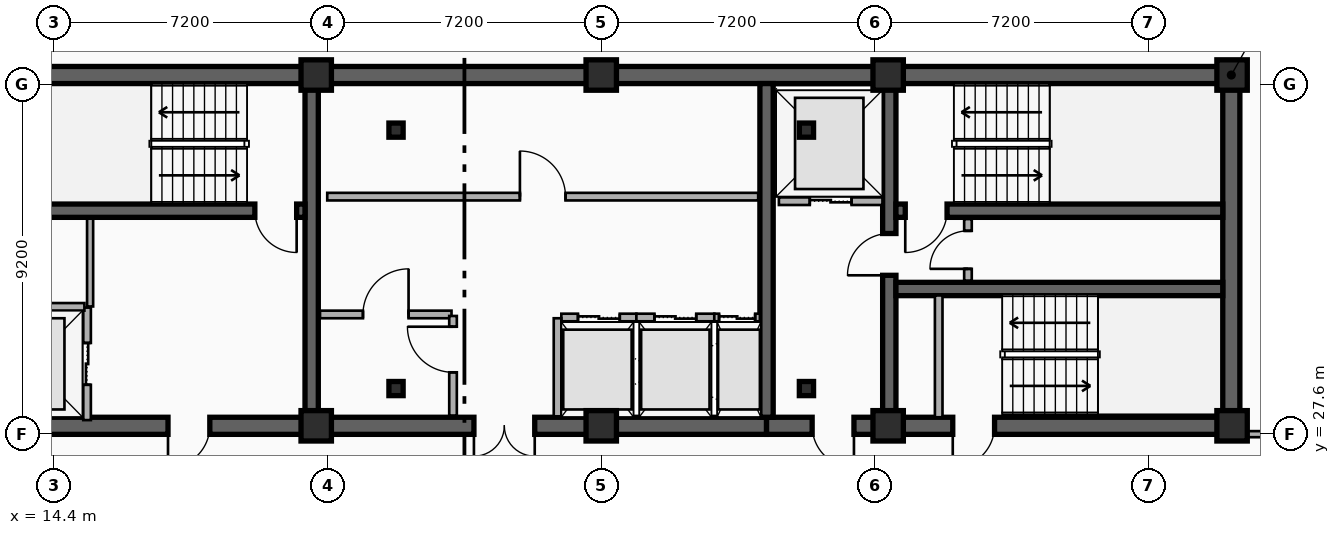
"""IFC4 building model, lengths in metres.
Left out: names, types, materials, properties, quantities, classifications, styles, units other than length and angle.
Written with IfcOpenShell. Run it as: python <this file> out.ifc"""

import sys

from ifc_helpers import new_model, si_unit, direction, frame, frame_2d, origin, origin_2d, place, context, subcontext, project, spatial, rectangle, i_section, extrude, element, fill, save


model = new_model("IFC4")
c1 = context("Model", 3, precision=1e-05, world=origin(), true_north=direction((0.0, 1.0)))
c2 = subcontext(c1, "Body", "Model", "MODEL_VIEW")
j1 = project(units=[si_unit("LENGTHUNIT", "METRE"), si_unit("PLANEANGLEUNIT", "RADIAN")], contexts=[c1])
p1 = place(None, origin())
s1 = spatial("IfcSite", under=j1, at=p1, CompositionType="ELEMENT")
p2 = place(p1, origin())
s2 = spatial("IfcBuilding", under=s1, at=p2, CompositionType="ELEMENT")
p3 = place(p2, frame((0.0, 0.0, 269.5)))
s3 = spatial("IfcBuildingStorey", under=s2, at=p3, CompositionType="ELEMENT", Elevation=269.5)
p4 = place(p3, frame((12.15, 37.05, 0.0), z_axis=(0.0, 0.0, 1.0), x_axis=(1.0, 0.0, 0.0)))
e1 = element("IfcWall", 1, at=p4, inside=s3, PredefinedType="SHEAR", context=c2, shape_type="SweptSolid", body=[
    extrude(rectangle(XDim=33.23, YDim=0.45, at=frame_2d((16.615, 0.0))), origin(), (0.0, 0.0, 1.0), 3.7),
])
p5 = place(p3, frame((21.18, 27.82, 0.0), z_axis=(0.0, 0.0, 1.0), x_axis=(-1.0, 0.0, 0.0)))
e2 = element("IfcWall", 2, at=p5, inside=s3, PredefinedType="SHEAR", context=c2, shape_type="SweptSolid", body=[
    extrude(rectangle(XDim=9.03, YDim=0.45, at=frame_2d((4.515, 0.0))), origin(), (0.0, 0.0, 1.0), 3.7),
])
p6 = place(p5, frame((2.68, 0.0, 0.0)))
e3 = element("IfcOpeningElement", 3, at=p6, cuts=e2, PredefinedType="OPENING", context=c2, shape_type="SweptSolid", body=[
    extrude(rectangle(XDim=1.1, YDim=2.15, at=frame_2d((0.55, 1.075))), frame((0.0, 0.235, 0.0), z_axis=(0.0, -1.0, 0.0), x_axis=(1.0, 0.0, 0.0)), (0.0, 0.0, 1.0), 0.47),
])
p7 = place(p3, frame((33.15, 27.82, 0.0), z_axis=(0.0, 0.0, 1.0), x_axis=(-1.0, 0.0, 0.0)))
e4 = element("IfcWall", 4, at=p7, inside=s3, PredefinedType="SHEAR", context=c2, shape_type="SweptSolid", body=[
    extrude(rectangle(XDim=11.97, YDim=0.45, at=frame_2d((5.985, 0.0))), origin(), (0.0, 0.0, 1.0), 3.7),
])
p8 = place(p7, frame((6.1, 0.0, 0.0)))
e5 = element("IfcOpeningElement", 5, at=p8, cuts=e4, PredefinedType="OPENING", context=c2, shape_type="SweptSolid", body=[
    extrude(rectangle(XDim=1.6, YDim=2.2, at=frame_2d((0.8, 1.1))), frame((0.0, 0.235, 0.0), z_axis=(0.0, -1.0, 0.0), x_axis=(1.0, 0.0, 0.0)), (0.0, 0.0, 1.0), 0.47),
])
p9 = place(p3, frame((45.38, 27.82, 0.0), z_axis=(0.0, 0.0, 1.0), x_axis=(-1.0, 0.0, 0.0)))
e6 = element("IfcWall", 6, at=p9, inside=s3, PredefinedType="SHEAR", context=c2, shape_type="SweptSolid", body=[
    extrude(rectangle(XDim=12.23, YDim=0.45, at=frame_2d((6.115, 0.0))), origin(), (0.0, 0.0, 1.0), 3.7),
])
p10 = place(p9, frame((9.93, 0.0, 0.0)))
e7 = element("IfcOpeningElement", 7, at=p10, cuts=e6, PredefinedType="OPENING", context=c2, shape_type="SweptSolid", body=[
    extrude(rectangle(XDim=1.1, YDim=2.15, at=frame_2d((0.55, 1.075))), frame((0.0, 0.235, 0.0), z_axis=(0.0, -1.0, 0.0), x_axis=(1.0, 0.0, 0.0)), (0.0, 0.0, 1.0), 0.47),
])
p11 = place(p9, frame((6.23, 0.0, 0.0)))
e8 = element("IfcOpeningElement", 8, at=p11, cuts=e6, PredefinedType="OPENING", context=c2, shape_type="SweptSolid", body=[
    extrude(rectangle(XDim=1.1, YDim=2.15, at=frame_2d((0.55, 1.075))), frame((0.0, 0.235, 0.0), z_axis=(0.0, -1.0, 0.0), x_axis=(1.0, 0.0, 0.0)), (0.0, 0.0, 1.0), 0.47),
])
p12 = place(p3, frame((45.38, 28.045, 0.0), z_axis=(0.0, 0.0, 1.0), x_axis=(0.0, 1.0, 0.0)))
e9 = element("IfcWall", 9, at=p12, inside=s3, PredefinedType="SHEAR", context=c2, shape_type="SweptSolid", body=[
    extrude(rectangle(XDim=8.78, YDim=0.45, at=frame_2d((4.39, 0.0))), origin(), (0.0, 0.0, 1.0), 3.7),
])
for number, where, z_axis, x_axis in (
    (10, (21.18, 28.045, 0.0), (0.0, 0.0, 1.0), (0.0, 1.0, 0.0)),
    (11, (33.15, 28.045, 0.0), (0.0, 0.0, 1.0), (0.0, 1.0, 0.0)),
):
    element("IfcWall", number, at=place(p3, frame(where, z_axis=z_axis, x_axis=x_axis)), inside=s3, PredefinedType="SHEAR", context=c2, shape_type="SweptSolid", body=[
        extrude(rectangle(XDim=8.78, YDim=0.35, at=frame_2d((4.39, 0.0))), origin(), (0.0, 0.0, 1.0), 3.7),
    ])
p13 = place(p3, frame((36.38, 28.045, 0.0), z_axis=(0.0, 0.0, 1.0), x_axis=(0.0, 1.0, 0.0)))
e12 = element("IfcWall", 12, at=p13, inside=s3, PredefinedType="SHEAR", context=c2, shape_type="SweptSolid", body=[
    extrude(rectangle(XDim=8.78, YDim=0.35, at=frame_2d((4.39, 0.0))), origin(), (0.0, 0.0, 1.0), 3.7),
])
p14 = place(p13, frame((3.735, 0.0, 0.0)))
e13 = element("IfcOpeningElement", 13, at=p14, cuts=e12, PredefinedType="OPENING", context=c2, shape_type="SweptSolid", body=[
    extrude(rectangle(XDim=1.1, YDim=2.15, at=frame_2d((0.55, 1.075))), frame((0.0, 0.185, 0.0), z_axis=(0.0, -1.0, 0.0), x_axis=(1.0, 0.0, 0.0)), (0.0, 0.0, 1.0), 0.37),
])
p15 = place(p3, frame((21.005, 33.48, 0.0), z_axis=(0.0, 0.0, 1.0), x_axis=(-1.0, 0.0, 0.0)))
e14 = element("IfcWall", 14, at=p15, inside=s3, PredefinedType="SHEAR", context=c2, shape_type="SweptSolid", body=[
    extrude(rectangle(XDim=8.63, YDim=0.35, at=frame_2d((4.315, 0.0))), origin(), (0.0, 0.0, 1.0), 3.7),
])
p16 = place(p15, frame((0.22, 0.0, 0.0)))
e15 = element("IfcOpeningElement", 15, at=p16, cuts=e14, PredefinedType="OPENING", context=c2, shape_type="SweptSolid", body=[
    extrude(rectangle(XDim=1.1, YDim=2.15, at=frame_2d((0.55, 1.075))), frame((0.0, 0.185, 0.0), z_axis=(0.0, -1.0, 0.0), x_axis=(1.0, 0.0, 0.0)), (0.0, 0.0, 1.0), 0.37),
])
p17 = place(p3, frame((45.155, 33.48, 0.0), z_axis=(0.0, 0.0, 1.0), x_axis=(-1.0, 0.0, 0.0)))
e16 = element("IfcWall", 16, at=p17, inside=s3, PredefinedType="SHEAR", context=c2, shape_type="SweptSolid", body=[
    extrude(rectangle(XDim=8.6, YDim=0.35, at=frame_2d((4.3, 0.0))), origin(), (0.0, 0.0, 1.0), 3.7),
])
p18 = place(p17, frame((7.255, 0.0, 0.0)))
e17 = element("IfcOpeningElement", 17, at=p18, cuts=e16, PredefinedType="OPENING", context=c2, shape_type="SweptSolid", body=[
    extrude(rectangle(XDim=1.1, YDim=2.15, at=frame_2d((0.55, 1.075))), frame((0.0, 0.185, 0.0), z_axis=(0.0, -1.0, 0.0), x_axis=(1.0, 0.0, 0.0)), (0.0, 0.0, 1.0), 0.37),
])
p19 = place(p3, frame((36.555, 31.42, 0.0), z_axis=(0.0, 0.0, 1.0), x_axis=(1.0, 0.0, 0.0)))
e18 = element("IfcWall", 18, at=p19, inside=s3, PredefinedType="SHEAR", context=c2, shape_type="SweptSolid", body=[
    extrude(rectangle(XDim=8.6, YDim=0.35, at=frame_2d((4.3, 0.0))), origin(), (0.0, 0.0, 1.0), 3.7),
])
for number, where, z_axis, x_axis in (
    (19, (23.4, 28.8, 0.0), (0.0, 0.0, 1.0), (1.0, 0.0, 0.0)),
    (20, (34.2, 28.8, 0.0), (0.0, 0.0, 1.0), (1.0, 0.0, 0.0)),
    (21, (34.2, 35.6, 0.0), (0.0, 0.0, 1.0), (1.0, 0.0, 0.0)),
    (22, (23.4, 35.6, 0.0), (0.0, 0.0, 1.0), (1.0, 0.0, 0.0)),
):
    element("IfcColumn", number, at=place(p3, frame(where, z_axis=z_axis, x_axis=x_axis)), inside=s3, PredefinedType="COLUMN", context=c2, shape_type="SweptSolid", body=[
        extrude(i_section(OverallWidth=0.374, OverallDepth=0.372, WebThickness=0.017, FlangeThickness=0.027, FilletRadius=0.015, at=origin_2d()), origin(), (0.0, 0.0, 1.0), 3.7),
    ])
for number, where, z_axis, x_axis in (
    (23, (21.3, 27.82, 0.0), (0.0, 0.0, 1.0), (1.0, 0.0, 0.0)),
    (24, (21.3, 37.05, 0.0), (0.0, 0.0, 1.0), (1.0, 0.0, 0.0)),
    (25, (28.8, 27.82, 0.0), (0.0, 0.0, 1.0), (1.0, 0.0, 0.0)),
    (26, (28.8, 37.05, 0.0), (0.0, 0.0, 1.0), (1.0, 0.0, 0.0)),
    (27, (36.35, 27.82, 0.0), (0.0, 0.0, 1.0), (1.0, 0.0, 0.0)),
    (28, (36.35, 37.05, 0.0), (0.0, 0.0, 1.0), (1.0, 0.0, 0.0)),
    (29, (45.4, 27.82, 0.0), (0.0, 0.0, 1.0), (1.0, 0.0, 0.0)),
    (30, (45.4, 37.05, 0.0), (0.0, 0.0, 1.0), (1.0, 0.0, 0.0)),
):
    element("IfcColumn", number, at=place(p3, frame(where, z_axis=z_axis, x_axis=x_axis)), inside=s3, PredefinedType="COLUMN", context=c2, shape_type="SweptSolid", body=[
        extrude(rectangle(XDim=0.8, YDim=0.8, at=origin_2d()), origin(), (0.0, 0.0, 1.0), 3.7),
    ])
p20 = place(p3, frame((15.27, 27.97, 0.0), z_axis=(0.0, 0.0, 1.0), x_axis=(0.0, 1.0, 0.0)))
e31 = element("IfcWall", 31, at=p20, inside=s3, PredefinedType="PARTITIONING", context=c2, shape_type="SweptSolid", body=[
    extrude(rectangle(XDim=2.96, YDim=0.2, at=frame_2d((1.48, 0.0))), origin(), (0.0, 0.0, 1.0), 2.49),
])
p21 = place(p20, frame((0.93, 0.0, 0.0)))
e32 = element("IfcOpeningElement", 32, at=p21, cuts=e31, PredefinedType="OPENING", context=c2, shape_type="SweptSolid", body=[
    extrude(rectangle(XDim=1.1, YDim=2.15, at=frame_2d((0.55, 1.075))), frame((0.0, 0.11, 0.0), z_axis=(0.0, -1.0, 0.0), x_axis=(1.0, 0.0, 0.0)), (0.0, 0.0, 1.0), 0.22),
])
p22 = place(p3, frame((12.45, 30.95, 0.0), z_axis=(0.0, 0.0, 1.0), x_axis=(1.0, 0.0, 0.0)))
e33 = element("IfcWall", 33, at=p22, inside=s3, PredefinedType="PARTITIONING", context=c2, shape_type="SweptSolid", body=[
    extrude(rectangle(XDim=2.75, YDim=0.2, at=frame_2d((1.375, 0.0))), origin(), (0.0, 0.0, 1.0), 2.49),
])
p23 = place(p3, frame((33.475, 33.73, 0.0), z_axis=(0.0, 0.0, 1.0), x_axis=(1.0, 0.0, 0.0)))
e34 = element("IfcWall", 34, at=p23, inside=s3, PredefinedType="PARTITIONING", context=c2, shape_type="SweptSolid", body=[
    extrude(rectangle(XDim=2.725, YDim=0.2, at=frame_2d((1.362, 0.0))), origin(), (0.0, 0.0, 1.0), 2.49),
])
p24 = place(p23, frame((0.812, 0.0, 0.0)))
e35 = element("IfcOpeningElement", 35, at=p24, cuts=e34, PredefinedType="OPENING", context=c2, shape_type="SweptSolid", body=[
    extrude(rectangle(XDim=1.1, YDim=2.15, at=frame_2d((0.55, 1.075))), frame((0.0, 0.11, 0.0), z_axis=(0.0, -1.0, 0.0), x_axis=(1.0, 0.0, 0.0)), (0.0, 0.0, 1.0), 0.22),
])
p25 = place(p3, frame((27.75, 30.67, 0.0), z_axis=(0.0, 0.0, 1.0), x_axis=(1.0, 0.0, 0.0)))
e36 = element("IfcWall", 36, at=p25, inside=s3, PredefinedType="PARTITIONING", context=c2, shape_type="SweptSolid", body=[
    extrude(rectangle(XDim=1.975, YDim=0.2, at=frame_2d((0.988, 0.0))), origin(), (0.0, 0.0, 1.0), 2.49),
])
p26 = place(p25, frame((0.438, 0.0, 0.0)))
e37 = element("IfcOpeningElement", 37, at=p26, cuts=e36, PredefinedType="OPENING", context=c2, shape_type="SweptSolid", body=[
    extrude(rectangle(XDim=1.1, YDim=2.15, at=frame_2d((0.55, 1.075))), frame((0.0, 0.11, 0.0), z_axis=(0.0, -1.0, 0.0), x_axis=(1.0, 0.0, 0.0)), (0.0, 0.0, 1.0), 0.22),
])
p27 = place(p3, frame((27.65, 28.07, 0.0), z_axis=(0.0, 0.0, 1.0), x_axis=(0.0, 1.0, 0.0)))
e38 = element("IfcWall", 38, at=p27, inside=s3, PredefinedType="PARTITIONING", context=c2, shape_type="SweptSolid", body=[
    extrude(rectangle(XDim=2.58, YDim=0.2, at=frame_2d((1.29, 0.0))), origin(), (0.0, 0.0, 1.0), 2.49),
])
p28 = place(p3, frame((29.725, 30.67, 0.0), z_axis=(0.0, 0.0, 1.0), x_axis=(1.0, 0.0, 0.0)))
e39 = element("IfcWall", 39, at=p28, inside=s3, PredefinedType="PARTITIONING", context=c2, shape_type="SweptSolid", body=[
    extrude(rectangle(XDim=2.05, YDim=0.2, at=frame_2d((1.025, 0.0))), origin(), (0.0, 0.0, 1.0), 2.8),
])
p29 = place(p28, frame((0.475, 0.0, 0.0)))
e40 = element("IfcOpeningElement", 40, at=p29, cuts=e39, PredefinedType="OPENING", context=c2, shape_type="SweptSolid", body=[
    extrude(rectangle(XDim=1.1, YDim=2.15, at=frame_2d((0.55, 1.075))), frame((0.0, 0.11, 0.0), z_axis=(0.0, -1.0, 0.0), x_axis=(1.0, 0.0, 0.0)), (0.0, 0.0, 1.0), 0.22),
])
p30 = place(p3, frame((31.775, 30.67, 0.0), z_axis=(0.0, 0.0, 1.0), x_axis=(1.0, 0.0, 0.0)))
e41 = element("IfcWall", 41, at=p30, inside=s3, PredefinedType="PARTITIONING", context=c2, shape_type="SweptSolid", body=[
    extrude(rectangle(XDim=1.2, YDim=0.2, at=frame_2d((0.6, 0.0))), origin(), (0.0, 0.0, 1.0), 2.8),
])
p31 = place(p30, frame((0.125, 0.0, 0.0)))
e42 = element("IfcOpeningElement", 42, at=p31, cuts=e41, PredefinedType="OPENING", context=c2, shape_type="SweptSolid", body=[
    extrude(rectangle(XDim=0.95, YDim=2.15, at=frame_2d((0.475, 1.075))), frame((0.0, 0.11, 0.0), z_axis=(0.0, -1.0, 0.0), x_axis=(1.0, 0.0, 0.0)), (0.0, 0.0, 1.0), 0.22),
])
p32 = place(p3, frame((37.68, 28.045, 0.0), z_axis=(0.0, 0.0, 1.0), x_axis=(0.0, 1.0, 0.0)))
e43 = element("IfcWall", 43, at=p32, inside=s3, PredefinedType="PARTITIONING", context=c2, shape_type="SweptSolid", body=[
    extrude(rectangle(XDim=3.205, YDim=0.2, at=frame_2d((1.603, 0.0))), origin(), (0.0, 0.0, 1.0), 2.8),
])
p33 = place(p3, frame((38.45, 31.64, 0.0), z_axis=(0.0, 0.0, 1.0), x_axis=(0.0, 1.0, 0.0)))
e44 = element("IfcWall", 44, at=p33, inside=s3, PredefinedType="PARTITIONING", context=c2, shape_type="SweptSolid", body=[
    extrude(rectangle(XDim=1.62, YDim=0.2, at=frame_2d((0.81, 0.0))), origin(), (0.0, 0.0, 1.0), 3.42),
])
p34 = place(p33, frame((0.31, 0.0, 0.0)))
e45 = element("IfcOpeningElement", 45, at=p34, cuts=e44, PredefinedType="OPENING", context=c2, shape_type="SweptSolid", body=[
    extrude(rectangle(XDim=1.0, YDim=2.15, at=frame_2d((0.5, 1.075))), frame((0.0, 0.11, 0.0), z_axis=(0.0, -1.0, 0.0), x_axis=(1.0, 0.0, 0.0)), (0.0, 0.0, 1.0), 0.22),
])
p35 = place(p3, frame((21.4, 30.75, 0.0), z_axis=(0.0, 0.0, 1.0), x_axis=(1.0, 0.0, 0.0)))
e46 = element("IfcWall", 46, at=p35, inside=s3, PredefinedType="PARTITIONING", context=c2, shape_type="SweptSolid", body=[
    extrude(rectangle(XDim=3.46, YDim=0.2, at=frame_2d((1.73, 0.0))), origin(), (0.0, 0.0, 1.0), 2.49),
])
p36 = place(p35, frame((1.13, 0.0, 0.0)))
e47 = element("IfcOpeningElement", 47, at=p36, cuts=e46, PredefinedType="OPENING", context=c2, shape_type="SweptSolid", body=[
    extrude(rectangle(XDim=1.2, YDim=2.15, at=frame_2d((0.6, 1.075))), frame((0.0, 0.11, 0.0), z_axis=(0.0, -1.0, 0.0), x_axis=(1.0, 0.0, 0.0)), (0.0, 0.0, 1.0), 0.22),
])
p37 = place(p3, frame((21.59, 33.85, 0.0), z_axis=(0.0, 0.0, 1.0), x_axis=(1.0, 0.0, 0.0)))
e48 = element("IfcWall", 48, at=p37, inside=s3, PredefinedType="PARTITIONING", context=c2, shape_type="SweptSolid", body=[
    extrude(rectangle(XDim=11.34, YDim=0.2, at=frame_2d((5.67, 0.0))), origin(), (0.0, 0.0, 1.0), 2.49),
])
p38 = place(p37, frame((5.07, 0.0, 0.0)))
e49 = element("IfcOpeningElement", 49, at=p38, cuts=e48, PredefinedType="OPENING", context=c2, shape_type="SweptSolid", body=[
    extrude(rectangle(XDim=1.2, YDim=2.15, at=frame_2d((0.6, 1.075))), frame((0.0, 0.11, 0.0), z_axis=(0.0, -1.0, 0.0), x_axis=(1.0, 0.0, 0.0)), (0.0, 0.0, 1.0), 0.22),
])
p39 = place(p3, frame((24.9, 28.09, 0.0), z_axis=(0.0, 0.0, 1.0), x_axis=(0.0, 1.0, 0.0)))
e50 = element("IfcWall", 50, at=p39, inside=s3, PredefinedType="PARTITIONING", context=c2, shape_type="SweptSolid", body=[
    extrude(rectangle(XDim=2.62, YDim=0.2, at=frame_2d((1.31, 0.0))), origin(), (0.0, 0.0, 1.0), 2.8),
])
p40 = place(p39, frame((1.137, 0.0, 0.0)))
e51 = element("IfcOpeningElement", 51, at=p40, cuts=e50, PredefinedType="OPENING", context=c2, shape_type="SweptSolid", body=[
    extrude(rectangle(XDim=1.2, YDim=2.15, at=frame_2d((0.6, 1.075))), frame((0.0, 0.11, 0.0), z_axis=(0.0, -1.0, 0.0), x_axis=(1.0, 0.0, 0.0)), (0.0, 0.0, 1.0), 0.22),
])
p41 = place(p3, frame((15.35, 30.96, 0.0), z_axis=(0.0, 0.0, 1.0), x_axis=(0.0, 1.0, 0.0)))
e52 = element("IfcWall", 52, at=p41, inside=s3, PredefinedType="PARTITIONING", context=c2, shape_type="SweptSolid", body=[
    extrude(rectangle(XDim=2.31, YDim=0.16, at=frame_2d((1.155, 0.0))), origin(), (0.0, 0.0, 1.0), 3.42),
])
p42 = place(p3, frame((45.41, 27.6, 0.0), z_axis=(0.0, 0.0, 1.0), x_axis=(1.0, 0.0, 0.0)))
e53 = element("IfcWall", 53, at=p42, inside=s3, PredefinedType="PARTITIONING", context=c2, shape_type="SweptSolid", body=[
    extrude(rectangle(XDim=0.91, YDim=0.16, at=frame_2d((0.455, 0.0))), origin(), (0.0, 0.0, 1.0), 2.49),
])
p43 = place(p21, origin())
e54 = element("IfcDoor", 54, at=p43, inside=s3, OperationType="DOUBLE_DOOR_SLIDING", PredefinedType="DOOR", context=c2, shape_type="SweptSolid", body=[
    extrude(rectangle(XDim=1.1, YDim=2.15, at=frame_2d((0.55, 1.075))), frame((0.0, 0.025, 0.0), z_axis=(0.0, -1.0, 0.0), x_axis=(1.0, 0.0, 0.0)), (0.0, 0.0, 1.0), 0.05),
])
fill(e32, e54)
p44 = place(p24, origin())
e55 = element("IfcDoor", 55, at=p44, inside=s3, OperationType="DOUBLE_DOOR_SLIDING", PredefinedType="DOOR", context=c2, shape_type="SweptSolid", body=[
    extrude(rectangle(XDim=1.1, YDim=2.15, at=frame_2d((0.55, 1.075))), frame((0.0, 0.025, 0.0), z_axis=(0.0, -1.0, 0.0), x_axis=(1.0, 0.0, 0.0)), (0.0, 0.0, 1.0), 0.05),
])
fill(e35, e55)
p45 = place(p26, origin())
e56 = element("IfcDoor", 56, at=p45, inside=s3, OperationType="DOUBLE_DOOR_SLIDING", PredefinedType="DOOR", context=c2, shape_type="SweptSolid", body=[
    extrude(rectangle(XDim=1.1, YDim=2.15, at=frame_2d((0.55, 1.075))), frame((0.0, 0.025, 0.0), z_axis=(0.0, -1.0, 0.0), x_axis=(1.0, 0.0, 0.0)), (0.0, 0.0, 1.0), 0.05),
])
fill(e37, e56)
p46 = place(p29, origin())
e57 = element("IfcDoor", 57, at=p46, inside=s3, OperationType="DOUBLE_DOOR_SLIDING", PredefinedType="DOOR", context=c2, shape_type="SweptSolid", body=[
    extrude(rectangle(XDim=1.1, YDim=2.15, at=frame_2d((0.55, 1.075))), frame((0.0, 0.025, 0.0), z_axis=(0.0, -1.0, 0.0), x_axis=(1.0, 0.0, 0.0)), (0.0, 0.0, 1.0), 0.05),
])
fill(e40, e57)
p47 = place(p31, origin())
e58 = element("IfcDoor", 58, at=p47, inside=s3, OperationType="DOUBLE_DOOR_SLIDING", PredefinedType="DOOR", context=c2, shape_type="SweptSolid", body=[
    extrude(rectangle(XDim=0.95, YDim=2.15, at=frame_2d((0.475, 1.075))), frame((0.0, 0.025, 0.0), z_axis=(0.0, -1.0, 0.0), x_axis=(1.0, 0.0, 0.0)), (0.0, 0.0, 1.0), 0.05),
])
fill(e42, e58)
p48 = place(p16, origin())
e59 = element("IfcDoor", 59, at=p48, inside=s3, OperationType="SINGLE_SWING_LEFT", PredefinedType="DOOR", context=c2, shape_type="SweptSolid", body=[
    extrude(rectangle(XDim=1.1, YDim=2.15, at=frame_2d((0.55, 1.075))), frame((0.0, 0.025, 0.0), z_axis=(0.0, -1.0, 0.0), x_axis=(1.0, 0.0, 0.0)), (0.0, 0.0, 1.0), 0.05),
])
fill(e15, e59)
p49 = place(p6, origin())
e60 = element("IfcDoor", 60, at=p49, inside=s3, OperationType="SINGLE_SWING_RIGHT", PredefinedType="DOOR", context=c2, shape_type="SweptSolid", body=[
    extrude(rectangle(XDim=1.1, YDim=2.15, at=frame_2d((0.55, 1.075))), frame((0.0, 0.025, 0.0), z_axis=(0.0, -1.0, 0.0), x_axis=(1.0, 0.0, 0.0)), (0.0, 0.0, 1.0), 0.05),
])
fill(e3, e60)
p50 = place(p18, origin())
e61 = element("IfcDoor", 61, at=p50, inside=s3, OperationType="SINGLE_SWING_RIGHT", PredefinedType="DOOR", context=c2, shape_type="SweptSolid", body=[
    extrude(rectangle(XDim=1.1, YDim=2.15, at=frame_2d((0.55, 1.075))), frame((0.0, 0.025, 0.0), z_axis=(0.0, -1.0, 0.0), x_axis=(1.0, 0.0, 0.0)), (0.0, 0.0, 1.0), 0.05),
])
fill(e17, e61)
p51 = place(p14, origin())
e62 = element("IfcDoor", 62, at=p51, inside=s3, OperationType="SINGLE_SWING_LEFT", PredefinedType="DOOR", context=c2, shape_type="SweptSolid", body=[
    extrude(rectangle(XDim=1.1, YDim=2.15, at=frame_2d((0.55, 1.075))), frame((0.0, 0.025, 0.0), z_axis=(0.0, -1.0, 0.0), x_axis=(1.0, 0.0, 0.0)), (0.0, 0.0, 1.0), 0.05),
])
fill(e13, e62)
p52 = place(p10, origin())
e63 = element("IfcDoor", 63, at=p52, inside=s3, OperationType="SINGLE_SWING_LEFT", PredefinedType="DOOR", context=c2, shape_type="SweptSolid", body=[
    extrude(rectangle(XDim=1.1, YDim=2.15, at=frame_2d((0.55, 1.075))), frame((0.0, 0.025, 0.0), z_axis=(0.0, -1.0, 0.0), x_axis=(1.0, 0.0, 0.0)), (0.0, 0.0, 1.0), 0.05),
])
fill(e7, e63)
p53 = place(p11, origin())
e64 = element("IfcDoor", 64, at=p53, inside=s3, OperationType="SINGLE_SWING_RIGHT", PredefinedType="DOOR", context=c2, shape_type="SweptSolid", body=[
    extrude(rectangle(XDim=1.1, YDim=2.15, at=frame_2d((0.55, 1.075))), frame((0.0, 0.025, 0.0), z_axis=(0.0, -1.0, 0.0), x_axis=(1.0, 0.0, 0.0)), (0.0, 0.0, 1.0), 0.05),
])
fill(e8, e64)
p54 = place(p8, origin())
e65 = element("IfcDoor", 65, at=p54, inside=s3, OperationType="SINGLE_SWING_LEFT", PredefinedType="DOOR", context=c2, shape_type="SweptSolid", body=[
    extrude(rectangle(XDim=1.6, YDim=2.2, at=frame_2d((0.8, 1.1))), frame((0.0, 0.025, 0.0), z_axis=(0.0, -1.0, 0.0), x_axis=(1.0, 0.0, 0.0)), (0.0, 0.0, 1.0), 0.05),
])
fill(e5, e65)
p55 = place(p34, origin())
e66 = element("IfcDoor", 66, at=p55, inside=s3, OperationType="SINGLE_SWING_LEFT", PredefinedType="DOOR", context=c2, shape_type="SweptSolid", body=[
    extrude(rectangle(XDim=1.0, YDim=2.15, at=frame_2d((0.5, 1.075))), frame((0.0, 0.025, 0.0), z_axis=(0.0, -1.0, 0.0), x_axis=(1.0, 0.0, 0.0)), (0.0, 0.0, 1.0), 0.05),
])
fill(e45, e66)
p56 = place(p36, origin())
e67 = element("IfcDoor", 67, at=p56, inside=s3, OperationType="SINGLE_SWING_RIGHT", PredefinedType="DOOR", context=c2, shape_type="SweptSolid", body=[
    extrude(rectangle(XDim=1.2, YDim=2.15, at=frame_2d((0.6, 1.075))), frame((0.0, 0.025, 0.0), z_axis=(0.0, -1.0, 0.0), x_axis=(1.0, 0.0, 0.0)), (0.0, 0.0, 1.0), 0.05),
])
fill(e47, e67)
p57 = place(p38, origin())
e68 = element("IfcDoor", 68, at=p57, inside=s3, OperationType="SINGLE_SWING_LEFT", PredefinedType="DOOR", context=c2, shape_type="SweptSolid", body=[
    extrude(rectangle(XDim=1.2, YDim=2.15, at=frame_2d((0.6, 1.075))), frame((0.0, 0.025, 0.0), z_axis=(0.0, -1.0, 0.0), x_axis=(1.0, 0.0, 0.0)), (0.0, 0.0, 1.0), 0.05),
])
fill(e49, e68)
p58 = place(p40, origin())
e69 = element("IfcDoor", 69, at=p58, inside=s3, OperationType="SINGLE_SWING_RIGHT", PredefinedType="DOOR", context=c2, shape_type="SweptSolid", body=[
    extrude(rectangle(XDim=1.2, YDim=2.15, at=frame_2d((0.6, 1.075))), frame((0.0, 0.025, 0.0), z_axis=(0.0, -1.0, 0.0), x_axis=(1.0, 0.0, 0.0)), (0.0, 0.0, 1.0), 0.05),
])
fill(e51, e69)
save(model, sys.argv[1])
